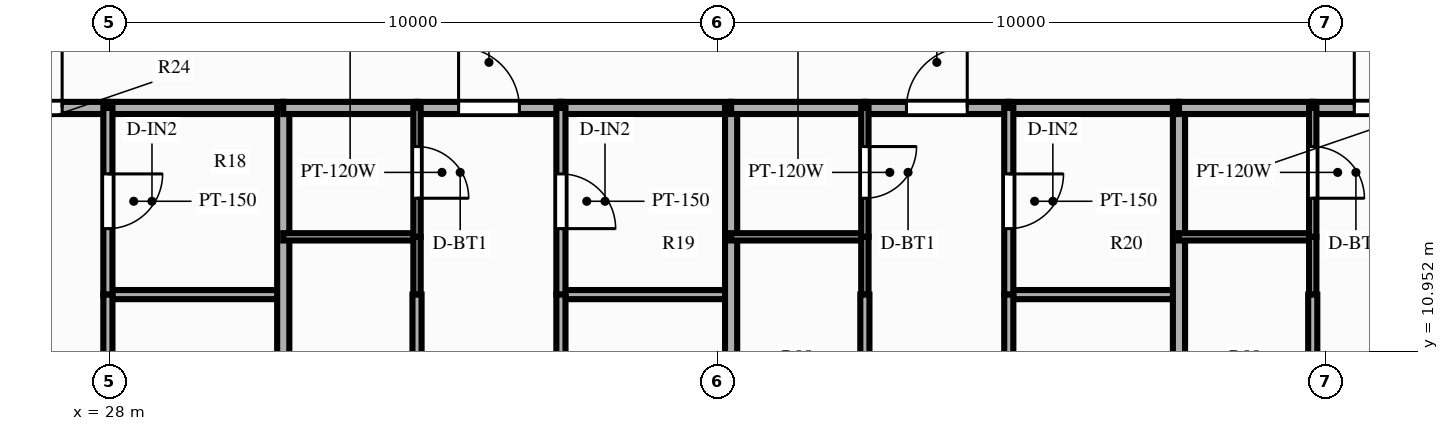
"""IFC4 building model, lengths in metres.
Left out: names, types, materials, properties, quantities, classifications, styles, units other than length and angle.
Written with IfcOpenShell. Run it as: python <this file> out.ifc"""

import sys

from ifc_helpers import new_model, si_unit, direction, frame, frame_2d, origin, place, context, subcontext, project, spatial, rectangle, extrude, source, transform, mapped, element, fill, save


model = new_model("IFC4")
c1 = context("Model", 3, precision=1e-05, world=origin(), true_north=direction((0.0, 1.0)))
c2 = subcontext(c1, "Body", "Model", "MODEL_VIEW")
j1 = project(units=[si_unit("LENGTHUNIT", "METRE"), si_unit("PLANEANGLEUNIT", "RADIAN")], contexts=[c1])
p1 = place(None, origin())
s1 = spatial("IfcSite", under=j1, at=p1, CompositionType="ELEMENT")
p2 = place(p1, origin())
s2 = spatial("IfcBuilding", under=s1, at=p2, CompositionType="ELEMENT")
p3 = place(p2, frame((0.0, 0.0, 19.4)))
s3 = spatial("IfcBuildingStorey", under=s2, at=p3, CompositionType="ELEMENT", Elevation=19.4)
p4 = place(p3, frame((25.469, 14.95, 0.0), z_axis=(0.0, 0.0, 1.0), x_axis=(1.0, 0.0, 0.0)))
e1 = element("IfcWall", 1, at=p4, inside=s3, PredefinedType="PARTITIONING", context=c2, shape_type="SweptSolid", body=[
    extrude(rectangle(XDim=2.505, YDim=0.2, at=frame_2d((1.252, 0.0))), origin(), (0.0, 0.0, 1.0), 2.79),
])
p5 = place(p4, frame((0.752, 0.0, 0.0)))
e2 = element("IfcOpeningElement", 2, at=p5, cuts=e1, PredefinedType="OPENING", context=c2, shape_type="SweptSolid", body=[
    extrude(rectangle(XDim=1.0, YDim=2.15, at=frame_2d((0.5, 1.075))), frame((0.0, 0.112, 0.0), z_axis=(0.0, -1.0, 0.0), x_axis=(1.0, 0.0, 0.0)), (0.0, 0.0, 1.0), 0.224),
])
p6 = place(p3, frame((27.974, 14.95, 0.0), z_axis=(0.0, 0.0, 1.0), x_axis=(1.0, 0.0, 0.0)))
e3 = element("IfcWall", 3, at=p6, inside=s3, PredefinedType="PARTITIONING", context=c2, shape_type="SweptSolid", body=[
    extrude(rectangle(XDim=2.884, YDim=0.2, at=frame_2d((1.442, 0.0))), origin(), (0.0, 0.0, 1.0), 2.79),
])
p7 = place(p3, frame((27.974, 11.88, 0.0), z_axis=(0.0, 0.0, 1.0), x_axis=(1.0, 0.0, 0.0)))
e4 = element("IfcWall", 4, at=p7, inside=s3, PredefinedType="PARTITIONING", context=c2, shape_type="SweptSolid", body=[
    extrude(rectangle(XDim=2.884, YDim=0.15, at=frame_2d((1.442, 0.0))), origin(), (0.0, 0.0, 1.0), 2.79),
])
p8 = place(p3, frame((27.974, 14.95, 0.0), z_axis=(0.0, 0.0, 1.0), x_axis=(0.0, -1.0, 0.0)))
e5 = element("IfcWall", 5, at=p8, inside=s3, PredefinedType="PARTITIONING", context=c2, shape_type="SweptSolid", body=[
    extrude(rectangle(XDim=3.07, YDim=0.15, at=frame_2d((1.535, 0.0))), origin(), (0.0, 0.0, 1.0), 2.79),
])
p9 = place(p8, frame((1.085, 0.0, 0.0)))
e6 = element("IfcOpeningElement", 6, at=p9, cuts=e5, PredefinedType="OPENING", context=c2, shape_type="SweptSolid", body=[
    extrude(rectangle(XDim=0.9, YDim=2.1, at=frame_2d((0.45, 1.05))), frame((0.0, 0.087, 0.0), z_axis=(0.0, -1.0, 0.0), x_axis=(1.0, 0.0, 0.0)), (0.0, 0.0, 1.0), 0.174),
])
p10 = place(p3, frame((27.974, 11.88, 0.0), z_axis=(0.0, 0.0, 1.0), x_axis=(0.0, -1.0, 0.0)))
e7 = element("IfcWall", 7, at=p10, inside=s3, PredefinedType="PARTITIONING", context=c2, shape_type="SweptSolid", body=[
    extrude(rectangle(XDim=8.73, YDim=0.15, at=frame_2d((4.365, 0.0))), origin(), (0.0, 0.0, 1.0), 2.79),
])
p11 = place(p10, frame((3.609, 0.0, 0.0)))
e8 = element("IfcOpeningElement", 8, at=p11, cuts=e7, PredefinedType="OPENING", context=c2, shape_type="SweptSolid", body=[
    extrude(rectangle(XDim=0.9, YDim=2.1, at=frame_2d((0.45, 1.05))), frame((0.0, 0.087, 0.0), z_axis=(0.0, -1.0, 0.0), x_axis=(1.0, 0.0, 0.0)), (0.0, 0.0, 1.0), 0.174),
])
p12 = place(p3, frame((30.858, 14.95, 0.0), z_axis=(0.0, 0.0, 1.0), x_axis=(0.0, -1.0, 0.0)))
e9 = element("IfcWall", 9, at=p12, inside=s3, PredefinedType="PARTITIONING", context=c2, shape_type="SweptSolid", body=[
    extrude(rectangle(XDim=11.8, YDim=0.2, at=frame_2d((5.9, 0.0))), origin(), (0.0, 0.0, 1.0), 2.24),
])
p13 = place(p3, frame((30.858, 14.95, 0.0), z_axis=(0.0, 0.0, 1.0), x_axis=(1.0, 0.0, 0.0)))
e10 = element("IfcWall", 10, at=p13, inside=s3, PredefinedType="PARTITIONING", context=c2, shape_type="SweptSolid", body=[
    extrude(rectangle(XDim=2.2, YDim=0.2, at=frame_2d((1.1, 0.0))), origin(), (0.0, 0.0, 1.0), 2.79),
])
p14 = place(p3, frame((33.058, 14.95, 0.0), z_axis=(0.0, 0.0, 1.0), x_axis=(1.0, 0.0, 0.0)))
e11 = element("IfcWall", 11, at=p14, inside=s3, PredefinedType="PARTITIONING", context=c2, shape_type="SweptSolid", body=[
    extrude(rectangle(XDim=2.367, YDim=0.2, at=frame_2d((1.183, 0.0))), origin(), (0.0, 0.0, 1.0), 2.79),
])
p15 = place(p14, frame((0.683, 0.0, 0.0)))
e12 = element("IfcOpeningElement", 12, at=p15, cuts=e11, PredefinedType="OPENING", context=c2, shape_type="SweptSolid", body=[
    extrude(rectangle(XDim=1.0, YDim=2.15, at=frame_2d((0.5, 1.075))), frame((0.0, 0.112, 0.0), z_axis=(0.0, -1.0, 0.0), x_axis=(1.0, 0.0, 0.0)), (0.0, 0.0, 1.0), 0.224),
])
p16 = place(p3, frame((35.424, 14.95, 0.0), z_axis=(0.0, 0.0, 1.0), x_axis=(1.0, 0.0, 0.0)))
e13 = element("IfcWall", 13, at=p16, inside=s3, PredefinedType="PARTITIONING", context=c2, shape_type="SweptSolid", body=[
    extrude(rectangle(XDim=2.799, YDim=0.2, at=frame_2d((1.399, 0.0))), origin(), (0.0, 0.0, 1.0), 2.79),
])
p17 = place(p3, frame((30.858, 12.83, 0.0), z_axis=(0.0, 0.0, 1.0), x_axis=(1.0, 0.0, 0.0)))
e14 = element("IfcWall", 14, at=p17, inside=s3, PredefinedType="PARTITIONING", context=c2, shape_type="SweptSolid", body=[
    extrude(rectangle(XDim=2.2, YDim=0.12, at=frame_2d((1.1, 0.0))), origin(), (0.0, 0.0, 1.0), 2.79),
])
p18 = place(p3, frame((35.424, 11.88, 0.0), z_axis=(0.0, 0.0, 1.0), x_axis=(1.0, 0.0, 0.0)))
e15 = element("IfcWall", 15, at=p18, inside=s3, PredefinedType="PARTITIONING", context=c2, shape_type="SweptSolid", body=[
    extrude(rectangle(XDim=2.799, YDim=0.15, at=frame_2d((1.399, 0.0))), origin(), (0.0, 0.0, 1.0), 2.79),
])
p19 = place(p3, frame((33.058, 14.95, 0.0), z_axis=(0.0, 0.0, 1.0), x_axis=(0.0, -1.0, 0.0)))
e16 = element("IfcWall", 16, at=p19, inside=s3, PredefinedType="PARTITIONING", context=c2, shape_type="SweptSolid", body=[
    extrude(rectangle(XDim=2.12, YDim=0.12, at=frame_2d((1.06, 0.0))), origin(), (0.0, 0.0, 1.0), 2.79),
])
p20 = place(p19, frame((0.635, 0.0, 0.0)))
e17 = element("IfcOpeningElement", 17, at=p20, cuts=e16, PredefinedType="OPENING", context=c2, shape_type="SweptSolid", body=[
    extrude(rectangle(XDim=0.85, YDim=2.05, at=frame_2d((0.425, 1.025))), frame((0.0, 0.072, 0.0), z_axis=(0.0, -1.0, 0.0), x_axis=(1.0, 0.0, 0.0)), (0.0, 0.0, 1.0), 0.144),
])
p21 = place(p3, frame((33.058, 12.83, 0.0), z_axis=(0.0, 0.0, 1.0), x_axis=(0.0, -1.0, 0.0)))
e18 = element("IfcWall", 18, at=p21, inside=s3, PredefinedType="PARTITIONING", context=c2, shape_type="SweptSolid", body=[
    extrude(rectangle(XDim=0.95, YDim=0.12, at=frame_2d((0.475, 0.0))), origin(), (0.0, 0.0, 1.0), 2.79),
])
p22 = place(p3, frame((33.058, 11.88, 0.0), z_axis=(0.0, 0.0, 1.0), x_axis=(0.0, -1.0, 0.0)))
e19 = element("IfcWall", 19, at=p22, inside=s3, PredefinedType="PARTITIONING", context=c2, shape_type="SweptSolid", body=[
    extrude(rectangle(XDim=8.73, YDim=0.15, at=frame_2d((4.365, 0.0))), origin(), (0.0, 0.0, 1.0), 2.79),
])
p23 = place(p22, frame((3.609, 0.0, 0.0)))
e20 = element("IfcOpeningElement", 20, at=p23, cuts=e19, PredefinedType="OPENING", context=c2, shape_type="SweptSolid", body=[
    extrude(rectangle(XDim=0.9, YDim=2.1, at=frame_2d((0.45, 1.05))), frame((0.0, 0.087, 0.0), z_axis=(0.0, -1.0, 0.0), x_axis=(1.0, 0.0, 0.0)), (0.0, 0.0, 1.0), 0.174),
])
p24 = place(p3, frame((35.424, 14.95, 0.0), z_axis=(0.0, 0.0, 1.0), x_axis=(0.0, -1.0, 0.0)))
e21 = element("IfcWall", 21, at=p24, inside=s3, PredefinedType="PARTITIONING", context=c2, shape_type="SweptSolid", body=[
    extrude(rectangle(XDim=3.07, YDim=0.15, at=frame_2d((1.535, 0.0))), origin(), (0.0, 0.0, 1.0), 2.79),
])
p25 = place(p24, frame((1.085, 0.0, 0.0)))
e22 = element("IfcOpeningElement", 22, at=p25, cuts=e21, PredefinedType="OPENING", context=c2, shape_type="SweptSolid", body=[
    extrude(rectangle(XDim=0.9, YDim=2.1, at=frame_2d((0.45, 1.05))), frame((0.0, 0.087, 0.0), z_axis=(0.0, -1.0, 0.0), x_axis=(1.0, 0.0, 0.0)), (0.0, 0.0, 1.0), 0.174),
])
p26 = place(p3, frame((35.424, 11.88, 0.0), z_axis=(0.0, 0.0, 1.0), x_axis=(0.0, -1.0, 0.0)))
e23 = element("IfcWall", 23, at=p26, inside=s3, PredefinedType="PARTITIONING", context=c2, shape_type="SweptSolid", body=[
    extrude(rectangle(XDim=8.73, YDim=0.15, at=frame_2d((4.365, 0.0))), origin(), (0.0, 0.0, 1.0), 2.79),
])
p27 = place(p26, frame((3.609, 0.0, 0.0)))
e24 = element("IfcOpeningElement", 24, at=p27, cuts=e23, PredefinedType="OPENING", context=c2, shape_type="SweptSolid", body=[
    extrude(rectangle(XDim=0.9, YDim=2.1, at=frame_2d((0.45, 1.05))), frame((0.0, 0.087, 0.0), z_axis=(0.0, -1.0, 0.0), x_axis=(1.0, 0.0, 0.0)), (0.0, 0.0, 1.0), 0.174),
])
p28 = place(p3, frame((38.223, 14.95, 0.0), z_axis=(0.0, 0.0, 1.0), x_axis=(0.0, -1.0, 0.0)))
e25 = element("IfcWall", 25, at=p28, inside=s3, PredefinedType="PARTITIONING", context=c2, shape_type="SweptSolid", body=[
    extrude(rectangle(XDim=11.8, YDim=0.2, at=frame_2d((5.9, 0.0))), origin(), (0.0, 0.0, 1.0), 2.79),
])
p29 = place(p3, frame((38.223, 14.95, 0.0), z_axis=(0.0, 0.0, 1.0), x_axis=(1.0, 0.0, 0.0)))
e26 = element("IfcWall", 26, at=p29, inside=s3, PredefinedType="PARTITIONING", context=c2, shape_type="SweptSolid", body=[
    extrude(rectangle(XDim=2.2, YDim=0.2, at=frame_2d((1.1, 0.0))), origin(), (0.0, 0.0, 1.0), 2.79),
])
p30 = place(p3, frame((40.423, 14.95, 0.0), z_axis=(0.0, 0.0, 1.0), x_axis=(1.0, 0.0, 0.0)))
e27 = element("IfcWall", 27, at=p30, inside=s3, PredefinedType="PARTITIONING", context=c2, shape_type="SweptSolid", body=[
    extrude(rectangle(XDim=2.367, YDim=0.2, at=frame_2d((1.183, 0.0))), origin(), (0.0, 0.0, 1.0), 2.79),
])
p31 = place(p30, frame((0.683, 0.0, 0.0)))
e28 = element("IfcOpeningElement", 28, at=p31, cuts=e27, PredefinedType="OPENING", context=c2, shape_type="SweptSolid", body=[
    extrude(rectangle(XDim=1.0, YDim=2.15, at=frame_2d((0.5, 1.075))), frame((0.0, 0.112, 0.0), z_axis=(0.0, -1.0, 0.0), x_axis=(1.0, 0.0, 0.0)), (0.0, 0.0, 1.0), 0.224),
])
p32 = place(p3, frame((42.79, 14.95, 0.0), z_axis=(0.0, 0.0, 1.0), x_axis=(1.0, 0.0, 0.0)))
e29 = element("IfcWall", 29, at=p32, inside=s3, PredefinedType="PARTITIONING", context=c2, shape_type="SweptSolid", body=[
    extrude(rectangle(XDim=2.799, YDim=0.2, at=frame_2d((1.399, 0.0))), origin(), (0.0, 0.0, 1.0), 2.79),
])
p33 = place(p3, frame((38.223, 12.83, 0.0), z_axis=(0.0, 0.0, 1.0), x_axis=(1.0, 0.0, 0.0)))
e30 = element("IfcWall", 30, at=p33, inside=s3, PredefinedType="PARTITIONING", context=c2, shape_type="SweptSolid", body=[
    extrude(rectangle(XDim=2.2, YDim=0.12, at=frame_2d((1.1, 0.0))), origin(), (0.0, 0.0, 1.0), 2.79),
])
p34 = place(p3, frame((42.79, 11.88, 0.0), z_axis=(0.0, 0.0, 1.0), x_axis=(1.0, 0.0, 0.0)))
e31 = element("IfcWall", 31, at=p34, inside=s3, PredefinedType="PARTITIONING", context=c2, shape_type="SweptSolid", body=[
    extrude(rectangle(XDim=2.799, YDim=0.15, at=frame_2d((1.399, 0.0))), origin(), (0.0, 0.0, 1.0), 2.79),
])
p35 = place(p3, frame((40.423, 14.95, 0.0), z_axis=(0.0, 0.0, 1.0), x_axis=(0.0, -1.0, 0.0)))
e32 = element("IfcWall", 32, at=p35, inside=s3, PredefinedType="PARTITIONING", context=c2, shape_type="SweptSolid", body=[
    extrude(rectangle(XDim=2.12, YDim=0.12, at=frame_2d((1.06, 0.0))), origin(), (0.0, 0.0, 1.0), 2.79),
])
p36 = place(p35, frame((0.635, 0.0, 0.0)))
e33 = element("IfcOpeningElement", 33, at=p36, cuts=e32, PredefinedType="OPENING", context=c2, shape_type="SweptSolid", body=[
    extrude(rectangle(XDim=0.85, YDim=2.05, at=frame_2d((0.425, 1.025))), frame((0.0, 0.072, 0.0), z_axis=(0.0, -1.0, 0.0), x_axis=(1.0, 0.0, 0.0)), (0.0, 0.0, 1.0), 0.144),
])
p37 = place(p3, frame((40.423, 12.83, 0.0), z_axis=(0.0, 0.0, 1.0), x_axis=(0.0, -1.0, 0.0)))
e34 = element("IfcWall", 34, at=p37, inside=s3, PredefinedType="PARTITIONING", context=c2, shape_type="SweptSolid", body=[
    extrude(rectangle(XDim=0.95, YDim=0.12, at=frame_2d((0.475, 0.0))), origin(), (0.0, 0.0, 1.0), 2.79),
])
p38 = place(p3, frame((40.423, 11.88, 0.0), z_axis=(0.0, 0.0, 1.0), x_axis=(0.0, -1.0, 0.0)))
e35 = element("IfcWall", 35, at=p38, inside=s3, PredefinedType="PARTITIONING", context=c2, shape_type="SweptSolid", body=[
    extrude(rectangle(XDim=8.73, YDim=0.15, at=frame_2d((4.365, 0.0))), origin(), (0.0, 0.0, 1.0), 2.79),
])
p39 = place(p38, frame((3.609, 0.0, 0.0)))
e36 = element("IfcOpeningElement", 36, at=p39, cuts=e35, PredefinedType="OPENING", context=c2, shape_type="SweptSolid", body=[
    extrude(rectangle(XDim=0.9, YDim=2.1, at=frame_2d((0.45, 1.05))), frame((0.0, 0.087, 0.0), z_axis=(0.0, -1.0, 0.0), x_axis=(1.0, 0.0, 0.0)), (0.0, 0.0, 1.0), 0.174),
])
p40 = place(p3, frame((42.79, 14.95, 0.0), z_axis=(0.0, 0.0, 1.0), x_axis=(0.0, -1.0, 0.0)))
e37 = element("IfcWall", 37, at=p40, inside=s3, PredefinedType="PARTITIONING", context=c2, shape_type="SweptSolid", body=[
    extrude(rectangle(XDim=3.07, YDim=0.15, at=frame_2d((1.535, 0.0))), origin(), (0.0, 0.0, 1.0), 2.79),
])
p41 = place(p40, frame((1.085, 0.0, 0.0)))
e38 = element("IfcOpeningElement", 38, at=p41, cuts=e37, PredefinedType="OPENING", context=c2, shape_type="SweptSolid", body=[
    extrude(rectangle(XDim=0.9, YDim=2.1, at=frame_2d((0.45, 1.05))), frame((0.0, 0.087, 0.0), z_axis=(0.0, -1.0, 0.0), x_axis=(1.0, 0.0, 0.0)), (0.0, 0.0, 1.0), 0.174),
])
p42 = place(p3, frame((42.79, 11.88, 0.0), z_axis=(0.0, 0.0, 1.0), x_axis=(0.0, -1.0, 0.0)))
e39 = element("IfcWall", 39, at=p42, inside=s3, PredefinedType="PARTITIONING", context=c2, shape_type="SweptSolid", body=[
    extrude(rectangle(XDim=8.73, YDim=0.15, at=frame_2d((4.365, 0.0))), origin(), (0.0, 0.0, 1.0), 2.79),
])
p43 = place(p42, frame((3.609, 0.0, 0.0)))
e40 = element("IfcOpeningElement", 40, at=p43, cuts=e39, PredefinedType="OPENING", context=c2, shape_type="SweptSolid", body=[
    extrude(rectangle(XDim=0.9, YDim=2.1, at=frame_2d((0.45, 1.05))), frame((0.0, 0.087, 0.0), z_axis=(0.0, -1.0, 0.0), x_axis=(1.0, 0.0, 0.0)), (0.0, 0.0, 1.0), 0.174),
])
p44 = place(p3, frame((45.589, 14.95, 0.0), z_axis=(0.0, 0.0, 1.0), x_axis=(0.0, -1.0, 0.0)))
e41 = element("IfcWall", 41, at=p44, inside=s3, PredefinedType="PARTITIONING", context=c2, shape_type="SweptSolid", body=[
    extrude(rectangle(XDim=11.8, YDim=0.2, at=frame_2d((5.9, 0.0))), origin(), (0.0, 0.0, 1.0), 2.24),
])
p45 = place(p3, frame((45.589, 14.95, 0.0), z_axis=(0.0, 0.0, 1.0), x_axis=(1.0, 0.0, 0.0)))
e42 = element("IfcWall", 42, at=p45, inside=s3, PredefinedType="PARTITIONING", context=c2, shape_type="SweptSolid", body=[
    extrude(rectangle(XDim=2.2, YDim=0.2, at=frame_2d((1.1, 0.0))), origin(), (0.0, 0.0, 1.0), 2.79),
])
p46 = place(p3, frame((47.789, 14.95, 0.0), z_axis=(0.0, 0.0, 1.0), x_axis=(1.0, 0.0, 0.0)))
e43 = element("IfcWall", 43, at=p46, inside=s3, PredefinedType="PARTITIONING", context=c2, shape_type="SweptSolid", body=[
    extrude(rectangle(XDim=2.367, YDim=0.2, at=frame_2d((1.183, 0.0))), origin(), (0.0, 0.0, 1.0), 2.79),
])
p47 = place(p46, frame((0.683, 0.0, 0.0)))
e44 = element("IfcOpeningElement", 44, at=p47, cuts=e43, PredefinedType="OPENING", context=c2, shape_type="SweptSolid", body=[
    extrude(rectangle(XDim=1.0, YDim=2.15, at=frame_2d((0.5, 1.075))), frame((0.0, 0.112, 0.0), z_axis=(0.0, -1.0, 0.0), x_axis=(1.0, 0.0, 0.0)), (0.0, 0.0, 1.0), 0.224),
])
p48 = place(p3, frame((45.589, 12.83, 0.0), z_axis=(0.0, 0.0, 1.0), x_axis=(1.0, 0.0, 0.0)))
e45 = element("IfcWall", 45, at=p48, inside=s3, PredefinedType="PARTITIONING", context=c2, shape_type="SweptSolid", body=[
    extrude(rectangle(XDim=2.2, YDim=0.12, at=frame_2d((1.1, 0.0))), origin(), (0.0, 0.0, 1.0), 2.79),
])
p49 = place(p3, frame((47.789, 14.95, 0.0), z_axis=(0.0, 0.0, 1.0), x_axis=(0.0, -1.0, 0.0)))
e46 = element("IfcWall", 46, at=p49, inside=s3, PredefinedType="PARTITIONING", context=c2, shape_type="SweptSolid", body=[
    extrude(rectangle(XDim=2.12, YDim=0.12, at=frame_2d((1.06, 0.0))), origin(), (0.0, 0.0, 1.0), 2.79),
])
p50 = place(p49, frame((0.635, 0.0, 0.0)))
e47 = element("IfcOpeningElement", 47, at=p50, cuts=e46, PredefinedType="OPENING", context=c2, shape_type="SweptSolid", body=[
    extrude(rectangle(XDim=0.85, YDim=2.05, at=frame_2d((0.425, 1.025))), frame((0.0, 0.072, 0.0), z_axis=(0.0, -1.0, 0.0), x_axis=(1.0, 0.0, 0.0)), (0.0, 0.0, 1.0), 0.144),
])
p51 = place(p3, frame((47.789, 12.83, 0.0), z_axis=(0.0, 0.0, 1.0), x_axis=(0.0, -1.0, 0.0)))
e48 = element("IfcWall", 48, at=p51, inside=s3, PredefinedType="PARTITIONING", context=c2, shape_type="SweptSolid", body=[
    extrude(rectangle(XDim=0.95, YDim=0.12, at=frame_2d((0.475, 0.0))), origin(), (0.0, 0.0, 1.0), 2.79),
])
p52 = place(p3, frame((47.789, 11.88, 0.0), z_axis=(0.0, 0.0, 1.0), x_axis=(0.0, -1.0, 0.0)))
e49 = element("IfcWall", 49, at=p52, inside=s3, PredefinedType="PARTITIONING", context=c2, shape_type="SweptSolid", body=[
    extrude(rectangle(XDim=8.73, YDim=0.15, at=frame_2d((4.365, 0.0))), origin(), (0.0, 0.0, 1.0), 2.79),
])
p53 = place(p52, frame((3.609, 0.0, 0.0)))
e50 = element("IfcOpeningElement", 50, at=p53, cuts=e49, PredefinedType="OPENING", context=c2, shape_type="SweptSolid", body=[
    extrude(rectangle(XDim=0.9, YDim=2.1, at=frame_2d((0.45, 1.05))), frame((0.0, 0.087, 0.0), z_axis=(0.0, -1.0, 0.0), x_axis=(1.0, 0.0, 0.0)), (0.0, 0.0, 1.0), 0.174),
])
m1 = source(origin(), c2, "Body", "SweptSolid", [
    extrude(rectangle(XDim=1.0, YDim=2.15, at=frame_2d((0.5, 1.075))), frame((0.0, 0.025, 0.0), z_axis=(0.0, -1.0, 0.0), x_axis=(1.0, 0.0, 0.0)), (0.0, 0.0, 1.0), 0.05),
])
p54 = place(p5, origin())
e51 = element("IfcDoor", 51, at=p54, inside=s3, OperationType="SINGLE_SWING_RIGHT", PredefinedType="DOOR", context=c2, shape_type="MappedRepresentation", body=[
    mapped(m1, transform((0.0, 0.0, 0.0), scale=1.0)),
])
fill(e2, e51)
m2 = source(origin(), c2, "Body", "SweptSolid", [
    extrude(rectangle(XDim=0.9, YDim=2.1, at=frame_2d((0.45, 1.05))), frame((0.0, 0.025, 0.0), z_axis=(0.0, -1.0, 0.0), x_axis=(1.0, 0.0, 0.0)), (0.0, 0.0, 1.0), 0.05),
])
p55 = place(p9, origin())
e52 = element("IfcDoor", 52, at=p55, inside=s3, OperationType="SINGLE_SWING_LEFT", PredefinedType="DOOR", context=c2, shape_type="MappedRepresentation", body=[
    mapped(m2, transform((0.0, 0.0, 0.0), scale=1.0)),
])
fill(e6, e52)
p56 = place(p15, origin())
e53 = element("IfcDoor", 53, at=p56, inside=s3, OperationType="SINGLE_SWING_LEFT", PredefinedType="DOOR", context=c2, shape_type="MappedRepresentation", body=[
    mapped(m1, transform((0.0, 0.0, 0.0), scale=1.0)),
])
fill(e12, e53)
m3 = source(origin(), c2, "Body", "SweptSolid", [
    extrude(rectangle(XDim=0.85, YDim=2.05, at=frame_2d((0.425, 1.025))), frame((0.0, 0.025, 0.0), z_axis=(0.0, -1.0, 0.0), x_axis=(1.0, 0.0, 0.0)), (0.0, 0.0, 1.0), 0.05),
])
p57 = place(p20, origin())
e54 = element("IfcDoor", 54, at=p57, inside=s3, OperationType="SINGLE_SWING_RIGHT", PredefinedType="DOOR", context=c2, shape_type="MappedRepresentation", body=[
    mapped(m3, transform((0.0, 0.0, 0.0), scale=1.0)),
])
fill(e17, e54)
p58 = place(p25, origin())
e55 = element("IfcDoor", 55, at=p58, inside=s3, OperationType="SINGLE_SWING_RIGHT", PredefinedType="DOOR", context=c2, shape_type="MappedRepresentation", body=[
    mapped(m2, transform((0.0, 0.0, 0.0), scale=1.0)),
])
fill(e22, e55)
p59 = place(p31, origin())
e56 = element("IfcDoor", 56, at=p59, inside=s3, OperationType="SINGLE_SWING_RIGHT", PredefinedType="DOOR", context=c2, shape_type="MappedRepresentation", body=[
    mapped(m1, transform((0.0, 0.0, 0.0), scale=1.0)),
])
fill(e28, e56)
p60 = place(p36, origin())
e57 = element("IfcDoor", 57, at=p60, inside=s3, OperationType="SINGLE_SWING_LEFT", PredefinedType="DOOR", context=c2, shape_type="MappedRepresentation", body=[
    mapped(m3, transform((0.0, 0.0, 0.0), scale=1.0)),
])
fill(e33, e57)
p61 = place(p41, origin())
e58 = element("IfcDoor", 58, at=p61, inside=s3, OperationType="SINGLE_SWING_LEFT", PredefinedType="DOOR", context=c2, shape_type="MappedRepresentation", body=[
    mapped(m2, transform((0.0, 0.0, 0.0), scale=1.0)),
])
fill(e38, e58)
p62 = place(p47, origin())
e59 = element("IfcDoor", 59, at=p62, inside=s3, OperationType="SINGLE_SWING_LEFT", PredefinedType="DOOR", context=c2, shape_type="MappedRepresentation", body=[
    mapped(m1, transform((0.0, 0.0, 0.0), scale=1.0)),
])
fill(e44, e59)
p63 = place(p50, origin())
e60 = element("IfcDoor", 60, at=p63, inside=s3, OperationType="SINGLE_SWING_RIGHT", PredefinedType="DOOR", context=c2, shape_type="MappedRepresentation", body=[
    mapped(m3, transform((0.0, 0.0, 0.0), scale=1.0)),
])
fill(e47, e60)
save(model, sys.argv[1])
